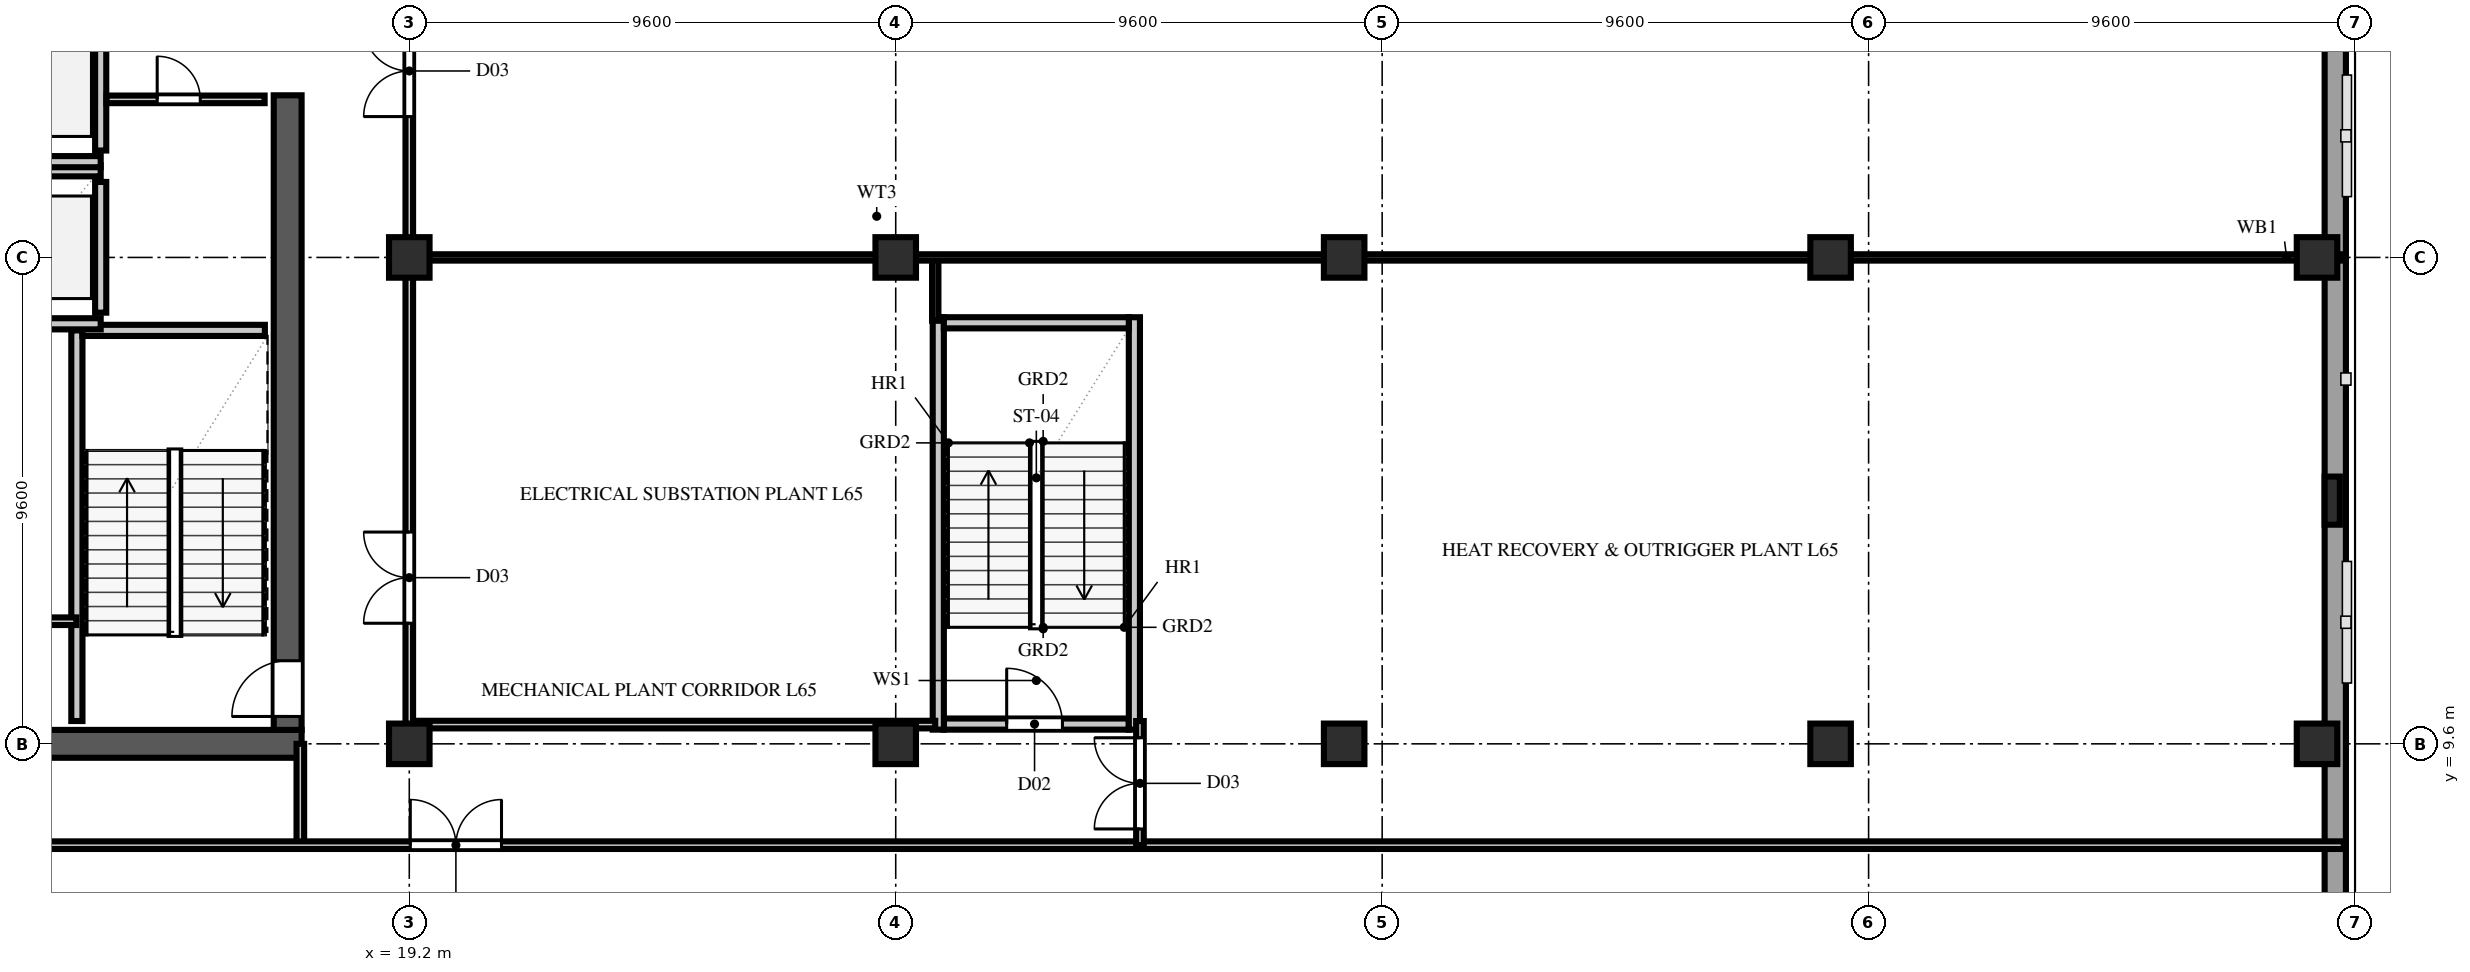
"""IFC4 building model, lengths in metres.
Left out: names, types, materials, properties, quantities, classifications, styles, units other than length and angle.
Written with IfcOpenShell. Run it as: python <this file> out.ifc"""

import sys

from ifc_helpers import new_model, si_unit, direction, frame, frame_2d, origin, origin_2d, place, context, subcontext, project, spatial, rectangle, extrude, element, fill, save


model = new_model("IFC4")
c1 = context("Model", 3, precision=1e-05, world=origin(), true_north=direction((0.0, 1.0)))
c2 = subcontext(c1, "Body", "Model", "MODEL_VIEW")
j1 = project(units=[si_unit("LENGTHUNIT", "METRE"), si_unit("PLANEANGLEUNIT", "RADIAN")], contexts=[c1])
p1 = place(None, origin())
s1 = spatial("IfcSite", under=j1, at=p1, CompositionType="ELEMENT")
p2 = place(p1, origin())
s2 = spatial("IfcBuilding", under=s1, at=p2, CompositionType="ELEMENT")
p3 = place(p2, frame((0.0, 0.0, 256.0)))
s3 = spatial("IfcBuildingStorey", under=s2, at=p3, CompositionType="ELEMENT", Elevation=256.0)
p4 = place(p3, frame((2.475, 9.6, 0.0), z_axis=(0.0, 0.0, 1.0), x_axis=(1.0, 0.0, 0.0)))
e1 = element("IfcWall", 1, at=p4, inside=s3, PredefinedType="SHEAR", context=c2, shape_type="SweptSolid", body=[
    extrude(rectangle(XDim=14.6, YDim=0.55, at=frame_2d((7.3, 0.0))), origin(), (0.0, 0.0, 1.0), 4.74),
])
p5 = place(p3, frame((16.8, 9.875, 0.0), z_axis=(0.0, 0.0, 1.0), x_axis=(0.0, 1.0, 0.0)))
e2 = element("IfcWall", 2, at=p5, inside=s3, PredefinedType="SHEAR", context=c2, shape_type="SweptSolid", body=[
    extrude(rectangle(XDim=12.525, YDim=0.55, at=frame_2d((6.262, 0.0))), origin(), (0.0, 0.0, 1.0), 4.74),
])
p6 = place(p5, frame((0.265, 0.0, 0.0)))
e3 = element("IfcOpeningElement", 3, at=p6, cuts=e2, PredefinedType="OPENING", context=c2, shape_type="SweptSolid", body=[
    extrude(rectangle(XDim=1.1, YDim=2.2, at=frame_2d((0.55, 1.1))), frame((0.0, 0.287, 0.0), z_axis=(0.0, -1.0, 0.0), x_axis=(1.0, 0.0, 0.0)), (0.0, 0.0, 1.0), 0.574),
])
for number, where, z_axis, x_axis in (
    (4, (19.2, 9.6, 0.0), (0.0, 0.0, 1.0), (1.0, 0.0, 0.0)),
    (5, (19.2, 19.2, 0.0), (0.0, 0.0, 1.0), (1.0, 0.0, 0.0)),
    (6, (28.8, 9.6, 0.0), (0.0, 0.0, 1.0), (1.0, 0.0, 0.0)),
    (7, (28.8, 19.2, 0.0), (0.0, 0.0, 1.0), (1.0, 0.0, 0.0)),
    (8, (37.65, 9.6, 0.0), (0.0, 0.0, 1.0), (1.0, 0.0, 0.0)),
    (9, (37.65, 19.2, 0.0), (0.0, 0.0, 1.0), (1.0, 0.0, 0.0)),
    (10, (47.25, 9.6, 0.0), (0.0, 0.0, 1.0), (1.0, 0.0, 0.0)),
    (11, (47.25, 19.2, 0.0), (0.0, 0.0, 1.0), (1.0, 0.0, 0.0)),
):
    element("IfcColumn", number, at=place(p3, frame(where, z_axis=z_axis, x_axis=x_axis)), inside=s3, PredefinedType="COLUMN", context=c2, shape_type="SweptSolid", body=[
        extrude(rectangle(XDim=0.8, YDim=0.8, at=origin_2d()), origin(), (0.0, 0.0, 1.0), 5.0),
    ])
for number, where, z_axis, x_axis in (
    (12, (56.85, 9.6, 0.0), (0.0, 0.0, 1.0), (1.0, 0.0, 0.0)),
    (13, (56.85, 19.2, 0.0), (0.0, 0.0, 1.0), (1.0, 0.0, 0.0)),
):
    element("IfcColumn", number, at=place(p3, frame(where, z_axis=z_axis, x_axis=x_axis)), inside=s3, PredefinedType="COLUMN", context=c2, shape_type="SweptSolid", body=[
        extrude(rectangle(XDim=0.8, YDim=0.8, at=origin_2d()), origin(), (0.0, 0.0, 1.0), 4.7),
    ])
p7 = place(p3, frame((57.15, 14.4, 0.0), z_axis=(0.0, 0.0, 1.0), x_axis=(0.0, 1.0, 0.0)))
e14 = element("IfcColumn", 14, at=p7, inside=s3, PredefinedType="PILASTER", context=c2, shape_type="SweptSolid", body=[
    extrude(rectangle(XDim=0.95, YDim=0.3, at=origin_2d()), origin(), (0.0, 0.0, 1.0), 4.7),
])
p8 = place(p3, frame((57.21, 1.84, 0.0), z_axis=(0.0, 0.0, 1.0), x_axis=(0.0, 1.0, 0.0)))
e15 = element("IfcWall", 15, at=p8, inside=s3, PredefinedType="SOLIDWALL", context=c2, shape_type="SweptSolid", body=[
    extrude(rectangle(XDim=34.72, YDim=0.42, at=frame_2d((17.36, 0.0))), origin(), (0.0, 0.0, 1.0), 4.7),
])
p9 = place(p3, frame((12.64, 10.05, 0.0), z_axis=(0.0, 0.0, 1.0), x_axis=(0.0, 1.0, 0.0)))
e16 = element("IfcWall", 16, at=p9, inside=s3, PredefinedType="SOLIDWALL", context=c2, shape_type="SweptSolid", body=[
    extrude(rectangle(XDim=7.71, YDim=0.22, at=frame_2d((3.855, 0.0))), origin(), (0.0, 0.0, 1.0), 4.74),
])
p10 = place(p3, frame((12.75, 17.76, 0.0), z_axis=(0.0, 0.0, 1.0), x_axis=(1.0, 0.0, 0.0)))
e17 = element("IfcWall", 17, at=p10, inside=s3, PredefinedType="SOLIDWALL", context=c2, shape_type="SweptSolid", body=[
    extrude(rectangle(XDim=3.6, YDim=0.22, at=frame_2d((1.8, 0.0))), origin(), (0.0, 0.0, 1.0), 4.74),
])
p11 = place(p3, frame((29.75, 9.99, 0.0), z_axis=(0.0, 0.0, 1.0), x_axis=(1.0, 0.0, 0.0)))
e18 = element("IfcWall", 18, at=p11, inside=s3, PredefinedType="SOLIDWALL", context=c2, shape_type="SweptSolid", body=[
    extrude(rectangle(XDim=3.65, YDim=0.22, at=frame_2d((1.825, 0.0))), origin(), (0.0, 0.0, 1.0), 4.74),
])
p12 = place(p11, frame((1.24, 0.0, 0.0)))
e19 = element("IfcOpeningElement", 19, at=p12, cuts=e18, PredefinedType="OPENING", context=c2, shape_type="SweptSolid", body=[
    extrude(rectangle(XDim=1.1, YDim=2.2, at=frame_2d((0.55, 1.1))), frame((0.0, 0.122, 0.0), z_axis=(0.0, -1.0, 0.0), x_axis=(1.0, 0.0, 0.0)), (0.0, 0.0, 1.0), 0.244),
])
for number, where, z_axis, x_axis in (
    (20, (29.64, 9.88, 0.0), (0.0, 0.0, 1.0), (0.0, 1.0, 0.0)),
    (21, (33.51, 9.88, 0.0), (0.0, 0.0, 1.0), (0.0, 1.0, 0.0)),
):
    element("IfcWall", number, at=place(p3, frame(where, z_axis=z_axis, x_axis=x_axis)), inside=s3, PredefinedType="SOLIDWALL", context=c2, shape_type="SweptSolid", body=[
        extrude(rectangle(XDim=8.14, YDim=0.22, at=frame_2d((4.07, 0.0))), origin(), (0.0, 0.0, 1.0), 4.74),
    ])
p13 = place(p3, frame((29.75, 17.91, 0.0), z_axis=(0.0, 0.0, 1.0), x_axis=(1.0, 0.0, 0.0)))
e22 = element("IfcWall", 22, at=p13, inside=s3, PredefinedType="SOLIDWALL", context=c2, shape_type="SweptSolid", body=[
    extrude(rectangle(XDim=3.65, YDim=0.22, at=frame_2d((1.825, 0.0))), origin(), (0.0, 0.0, 1.0), 4.74),
])
p14 = place(p3, frame((13.11, 18.11, 0.0), z_axis=(0.0, 0.0, 1.0), x_axis=(0.0, 1.0, 0.0)))
e23 = element("IfcWall", 23, at=p14, inside=s3, PredefinedType="SOLIDWALL", context=c2, shape_type="SweptSolid", body=[
    extrude(rectangle(XDim=2.58, YDim=0.22, at=frame_2d((1.29, 0.0))), origin(), (0.0, 0.0, 1.0), 4.74),
])
for number, where, z_axis, x_axis in (
    (24, (10.49, 17.89, 0.0), (0.0, 0.0, 1.0), (1.0, 0.0, 0.0)),
    (25, (10.49, 20.91, 0.0), (0.0, 0.0, 1.0), (1.0, 0.0, 0.0)),
):
    element("IfcWall", number, at=place(p3, frame(where, z_axis=z_axis, x_axis=x_axis)), inside=s3, PredefinedType="SOLIDWALL", context=c2, shape_type="SweptSolid", body=[
        extrude(rectangle(XDim=2.62, YDim=0.22, at=frame_2d((1.31, 0.0))), origin(), (0.0, 0.0, 1.0), 4.74),
    ])
p15 = place(p3, frame((13.11, 21.31, 0.0), z_axis=(0.0, 0.0, 1.0), x_axis=(0.0, 1.0, 0.0)))
e26 = element("IfcWall", 26, at=p15, inside=s3, PredefinedType="SOLIDWALL", context=c2, shape_type="SweptSolid", body=[
    extrude(rectangle(XDim=2.58, YDim=0.22, at=frame_2d((1.29, 0.0))), origin(), (0.0, 0.0, 1.0), 4.74),
])
p16 = place(p3, frame((10.49, 21.09, 0.0), z_axis=(0.0, 0.0, 1.0), x_axis=(1.0, 0.0, 0.0)))
e27 = element("IfcWall", 27, at=p16, inside=s3, PredefinedType="SOLIDWALL", context=c2, shape_type="SweptSolid", body=[
    extrude(rectangle(XDim=2.62, YDim=0.22, at=frame_2d((1.31, 0.0))), origin(), (0.0, 0.0, 1.0), 4.74),
])
p17 = place(p3, frame((10.55, 12.02, 0.0), z_axis=(0.0, 0.0, 1.0), x_axis=(1.0, 0.0, 0.0)))
e28 = element("IfcWall", 28, at=p17, inside=s3, PredefinedType="PARTITIONING", context=c2, shape_type="SweptSolid", body=[
    extrude(rectangle(XDim=2.08, YDim=0.15, at=frame_2d((1.04, 0.0))), origin(), (0.0, 0.0, 1.0), 4.74),
])
p18 = place(p17, frame((0.5, 0.0, 0.0)))
e29 = element("IfcOpeningElement", 29, at=p18, cuts=e28, PredefinedType="OPENING", context=c2, shape_type="SweptSolid", body=[
    extrude(rectangle(XDim=0.85, YDim=2.1, at=frame_2d((0.425, 1.05))), frame((0.0, 0.087, 0.0), z_axis=(0.0, -1.0, 0.0), x_axis=(1.0, 0.0, 0.0)), (0.0, 0.0, 1.0), 0.174),
])
p19 = place(p3, frame((13.225, 22.32, 0.0), z_axis=(0.0, 0.0, 1.0), x_axis=(1.0, 0.0, 0.0)))
e30 = element("IfcWall", 30, at=p19, inside=s3, PredefinedType="PARTITIONING", context=c2, shape_type="SweptSolid", body=[
    extrude(rectangle(XDim=3.12, YDim=0.15, at=frame_2d((1.56, 0.0))), origin(), (0.0, 0.0, 1.0), 4.74),
])
p20 = place(p19, frame((1.0, 0.0, 0.0)))
e31 = element("IfcOpeningElement", 31, at=p20, cuts=e30, PredefinedType="OPENING", context=c2, shape_type="SweptSolid", body=[
    extrude(rectangle(XDim=0.85, YDim=2.1, at=frame_2d((0.425, 1.05))), frame((0.0, 0.087, 0.0), z_axis=(0.0, -1.0, 0.0), x_axis=(1.0, 0.0, 0.0)), (0.0, 0.0, 1.0), 0.174),
])
p21 = place(p3, frame((17.05, 7.6, 0.0), z_axis=(0.0, 0.0, 1.0), x_axis=(0.0, 1.0, 0.0)))
e32 = element("IfcWall", 32, at=p21, inside=s3, PredefinedType="PARTITIONING", context=c2, shape_type="SweptSolid", body=[
    extrude(rectangle(XDim=2.0, YDim=0.15, at=frame_2d((1.0, 0.0))), origin(), (0.0, 0.0, 1.0), 4.74),
])
p22 = place(p3, frame((0.22, 7.6, 0.0), z_axis=(0.0, 0.0, 1.0), x_axis=(1.0, 0.0, 0.0)))
e33 = element("IfcWall", 33, at=p22, inside=s3, PredefinedType="PARTITIONING", context=c2, shape_type="SweptSolid", body=[
    extrude(rectangle(XDim=57.16, YDim=0.15, at=frame_2d((28.58, 0.0))), origin(), (0.0, 0.0, 1.0), 4.74),
])
p23 = place(p22, frame((19.0, 0.0, 0.0)))
e34 = element("IfcOpeningElement", 34, at=p23, cuts=e33, PredefinedType="OPENING", context=c2, shape_type="SweptSolid", body=[
    extrude(rectangle(XDim=1.8, YDim=2.2, at=frame_2d((0.9, 1.1))), frame((0.0, 0.087, 0.0), z_axis=(0.0, -1.0, 0.0), x_axis=(1.0, 0.0, 0.0)), (0.0, 0.0, 1.0), 0.174),
])
p24 = place(p3, frame((33.62, 7.6, 0.0), z_axis=(0.0, 0.0, 1.0), x_axis=(0.0, 1.0, 0.0)))
e35 = element("IfcWall", 35, at=p24, inside=s3, PredefinedType="PARTITIONING", context=c2, shape_type="SweptSolid", body=[
    extrude(rectangle(XDim=2.45, YDim=0.15, at=frame_2d((1.225, 0.0))), origin(), (0.0, 0.0, 1.0), 4.74),
])
p25 = place(p24, frame((0.32, 0.0, 0.0)))
e36 = element("IfcOpeningElement", 36, at=p25, cuts=e35, PredefinedType="OPENING", context=c2, shape_type="SweptSolid", body=[
    extrude(rectangle(XDim=1.8, YDim=2.2, at=frame_2d((0.9, 1.1))), frame((0.0, 0.087, 0.0), z_axis=(0.0, -1.0, 0.0), x_axis=(1.0, 0.0, 0.0)), (0.0, 0.0, 1.0), 0.174),
])
p26 = place(p3, frame((19.2, 9.98, 0.0), z_axis=(0.0, 0.0, 1.0), x_axis=(1.0, 0.0, 0.0)))
e37 = element("IfcWall", 37, at=p26, inside=s3, PredefinedType="PARTITIONING", context=c2, shape_type="SweptSolid", body=[
    extrude(rectangle(XDim=10.38, YDim=0.15, at=frame_2d((5.19, 0.0))), origin(), (0.0, 0.0, 1.0), 4.74),
])
p27 = place(p3, frame((29.58, 17.95, 0.0), z_axis=(0.0, 0.0, 1.0), x_axis=(0.0, 1.0, 0.0)))
e38 = element("IfcWall", 38, at=p27, inside=s3, PredefinedType="PARTITIONING", context=c2, shape_type="SweptSolid", body=[
    extrude(rectangle(XDim=1.25, YDim=0.125, at=frame_2d((0.625, 0.0))), origin(), (0.0, 0.0, 1.0), 4.74),
])
p28 = place(p3, frame((19.2, 19.2, 0.0), z_axis=(0.0, 0.0, 1.0), x_axis=(1.0, 0.0, 0.0)))
e39 = element("IfcWall", 39, at=p28, inside=s3, PredefinedType="PARTITIONING", context=c2, shape_type="SweptSolid", body=[
    extrude(rectangle(XDim=18.45, YDim=0.125, at=frame_2d((9.225, 0.0))), origin(), (0.0, 0.0, 1.0), 2.323),
])
p29 = place(p3, frame((37.65, 19.2, 0.0), z_axis=(0.0, 0.0, 1.0), x_axis=(1.0, 0.0, 0.0)))
e40 = element("IfcWall", 40, at=p29, inside=s3, PredefinedType="PARTITIONING", context=c2, shape_type="SweptSolid", body=[
    extrude(rectangle(XDim=9.6, YDim=0.125, at=frame_2d((4.8, 0.0))), origin(), (0.0, 0.0, 1.0), 3.967),
])
p30 = place(p3, frame((47.25, 19.2, 0.0), z_axis=(0.0, 0.0, 1.0), x_axis=(1.0, 0.0, 0.0)))
e41 = element("IfcWall", 41, at=p30, inside=s3, PredefinedType="PARTITIONING", context=c2, shape_type="SweptSolid", body=[
    extrude(rectangle(XDim=9.6, YDim=0.125, at=frame_2d((4.8, 0.0))), origin(), (0.0, 0.0, 1.0), 3.927),
])
p31 = place(p3, frame((56.85, 19.2, 0.0), z_axis=(0.0, 0.0, 1.0), x_axis=(1.0, 0.0, 0.0)))
e42 = element("IfcWall", 42, at=p31, inside=s3, PredefinedType="PARTITIONING", context=c2, shape_type="SweptSolid", body=[
    extrude(rectangle(XDim=0.53, YDim=0.125, at=frame_2d((0.265, 0.0))), origin(), (0.0, 0.0, 1.0), 4.74),
])
p32 = place(p3, frame((19.2, 9.98, 0.0), z_axis=(0.0, 0.0, 1.0), x_axis=(0.0, 1.0, 0.0)))
e43 = element("IfcWall", 43, at=p32, inside=s3, PredefinedType="PARTITIONING", context=c2, shape_type="SweptSolid", body=[
    extrude(rectangle(XDim=37.27, YDim=0.15, at=frame_2d((18.635, 0.0))), origin(), (0.0, 0.0, 1.0), 3.967),
])
p33 = place(p32, frame((2.0, 0.0, 0.0)))
e44 = element("IfcOpeningElement", 44, at=p33, cuts=e43, PredefinedType="OPENING", context=c2, shape_type="SweptSolid", body=[
    extrude(rectangle(XDim=1.8, YDim=2.2, at=frame_2d((0.9, 1.1))), frame((0.0, 0.087, 0.0), z_axis=(0.0, -1.0, 0.0), x_axis=(1.0, 0.0, 0.0)), (0.0, 0.0, 1.0), 0.174),
])
p34 = place(p32, frame((12.0, 0.0, 0.0)))
e45 = element("IfcOpeningElement", 45, at=p34, cuts=e43, PredefinedType="OPENING", context=c2, shape_type="SweptSolid", body=[
    extrude(rectangle(XDim=1.8, YDim=2.2, at=frame_2d((0.9, 1.1))), frame((0.0, 0.087, 0.0), z_axis=(0.0, -1.0, 0.0), x_axis=(1.0, 0.0, 0.0)), (0.0, 0.0, 1.0), 0.174),
])
p35 = place(p32, frame((30.5, 0.0, 0.0)))
e46 = element("IfcOpeningElement", 46, at=p35, cuts=e43, PredefinedType="OPENING", context=c2, shape_type="SweptSolid", body=[
    extrude(rectangle(XDim=1.2, YDim=2.2, at=frame_2d((0.6, 1.1))), frame((0.0, 0.087, 0.0), z_axis=(0.0, -1.0, 0.0), x_axis=(1.0, 0.0, 0.0)), (0.0, 0.0, 1.0), 0.174),
])
p36 = place(p6, origin())
e47 = element("IfcDoor", 47, at=p36, inside=s3, OperationType="SINGLE_SWING_LEFT", PredefinedType="DOOR", context=c2, shape_type="SweptSolid", body=[
    extrude(rectangle(XDim=1.1, YDim=2.2, at=frame_2d((0.55, 1.1))), frame((0.0, 0.025, 0.0), z_axis=(0.0, -1.0, 0.0), x_axis=(1.0, 0.0, 0.0)), (0.0, 0.0, 1.0), 0.05),
])
fill(e3, e47)
p37 = place(p12, origin())
e48 = element("IfcDoor", 48, at=p37, inside=s3, OperationType="SINGLE_SWING_LEFT", PredefinedType="DOOR", context=c2, shape_type="SweptSolid", body=[
    extrude(rectangle(XDim=1.1, YDim=2.2, at=frame_2d((0.55, 1.1))), frame((0.0, 0.025, 0.0), z_axis=(0.0, -1.0, 0.0), x_axis=(1.0, 0.0, 0.0)), (0.0, 0.0, 1.0), 0.05),
])
fill(e19, e48)
p38 = place(p20, origin())
e49 = element("IfcDoor", 49, at=p38, inside=s3, OperationType="SINGLE_SWING_LEFT", PredefinedType="DOOR", context=c2, shape_type="SweptSolid", body=[
    extrude(rectangle(XDim=0.85, YDim=2.1, at=frame_2d((0.425, 1.05))), frame((0.0, 0.025, 0.0), z_axis=(0.0, -1.0, 0.0), x_axis=(1.0, 0.0, 0.0)), (0.0, 0.0, 1.0), 0.05),
])
fill(e31, e49)
p39 = place(p23, origin())
e50 = element("IfcDoor", 50, at=p39, inside=s3, OperationType="DOUBLE_DOOR_SINGLE_SWING", PredefinedType="DOOR", context=c2, shape_type="SweptSolid", body=[
    extrude(rectangle(XDim=1.8, YDim=2.2, at=frame_2d((0.9, 1.1))), frame((0.0, 0.025, 0.0), z_axis=(0.0, -1.0, 0.0), x_axis=(1.0, 0.0, 0.0)), (0.0, 0.0, 1.0), 0.05),
])
fill(e34, e50)
p40 = place(p25, origin())
e51 = element("IfcDoor", 51, at=p40, inside=s3, OperationType="DOUBLE_DOOR_SINGLE_SWING", PredefinedType="DOOR", context=c2, shape_type="SweptSolid", body=[
    extrude(rectangle(XDim=1.8, YDim=2.2, at=frame_2d((0.9, 1.1))), frame((0.0, 0.025, 0.0), z_axis=(0.0, -1.0, 0.0), x_axis=(1.0, 0.0, 0.0)), (0.0, 0.0, 1.0), 0.05),
])
fill(e36, e51)
p41 = place(p33, origin())
e52 = element("IfcDoor", 52, at=p41, inside=s3, OperationType="DOUBLE_DOOR_SINGLE_SWING", PredefinedType="DOOR", context=c2, shape_type="SweptSolid", body=[
    extrude(rectangle(XDim=1.8, YDim=2.2, at=frame_2d((0.9, 1.1))), frame((0.0, 0.025, 0.0), z_axis=(0.0, -1.0, 0.0), x_axis=(1.0, 0.0, 0.0)), (0.0, 0.0, 1.0), 0.05),
])
fill(e44, e52)
p42 = place(p34, origin())
e53 = element("IfcDoor", 53, at=p42, inside=s3, OperationType="DOUBLE_DOOR_SINGLE_SWING", PredefinedType="DOOR", context=c2, shape_type="SweptSolid", body=[
    extrude(rectangle(XDim=1.8, YDim=2.2, at=frame_2d((0.9, 1.1))), frame((0.0, 0.025, 0.0), z_axis=(0.0, -1.0, 0.0), x_axis=(1.0, 0.0, 0.0)), (0.0, 0.0, 1.0), 0.05),
])
fill(e45, e53)
save(model, sys.argv[1])
